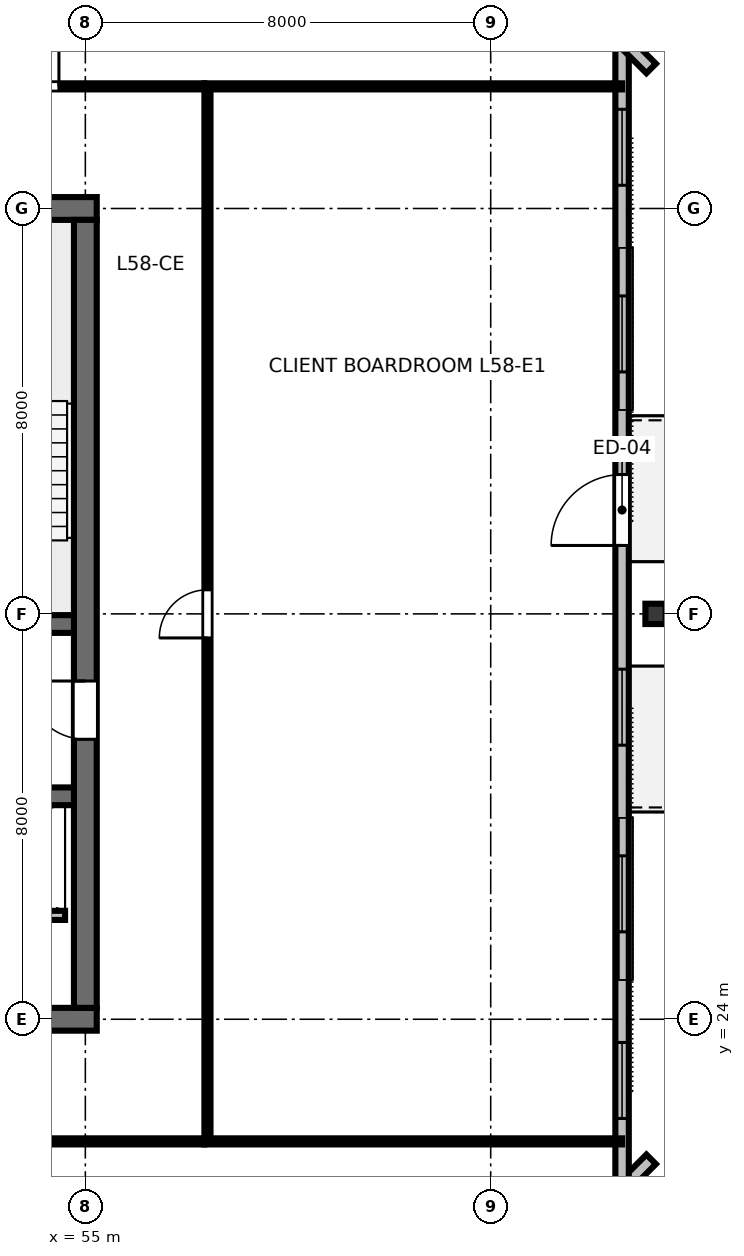
"""IFC4 building model, lengths in metres.
Left out: names, types, materials, properties, quantities, classifications, styles, units other than length and angle.
Written with IfcOpenShell. Run it as: python <this file> out.ifc"""

import sys

from ifc_helpers import new_model, si_unit, direction, frame, frame_2d, origin, origin_2d, place, context, subcontext, project, spatial, rectangle, i_section, extrude, element, fill, save


model = new_model("IFC4")
c1 = context("Model", 3, precision=1e-05, world=origin(), true_north=direction((0.0, 1.0)))
c2 = subcontext(c1, "Body", "Model", "MODEL_VIEW")
j1 = project(units=[si_unit("LENGTHUNIT", "METRE"), si_unit("PLANEANGLEUNIT", "RADIAN")], contexts=[c1])
p1 = place(None, origin())
s1 = spatial("IfcSite", under=j1, at=p1, CompositionType="ELEMENT")
p2 = place(p1, origin())
s2 = spatial("IfcBuilding", under=s1, at=p2, CompositionType="ELEMENT")
p3 = place(p2, frame((0.0, 0.0, 220.2)))
s3 = spatial("IfcBuildingStorey", under=s2, at=p3, CompositionType="ELEMENT", Elevation=220.2)
p4 = place(p3, frame((36.775, 24.0, 0.0), z_axis=(0.0, 0.0, 1.0), x_axis=(1.0, 0.0, 0.0)))
e1 = element("IfcWall", 1, at=p4, inside=s3, PredefinedType="SHEAR", context=c2, shape_type="SweptSolid", body=[
    extrude(rectangle(XDim=18.45, YDim=0.45, at=frame_2d((9.225, 0.0))), origin(), (0.0, 0.0, 1.0), 3.36),
])
p5 = place(p4, frame((13.425, 0.0, 0.0)))
e2 = element("IfcOpeningElement", 2, at=p5, cuts=e1, PredefinedType="OPENING", context=c2, shape_type="SweptSolid", body=[
    extrude(rectangle(XDim=1.6, YDim=2.15, at=frame_2d((0.8, 1.075))), frame((0.0, 0.235, 0.0), z_axis=(0.0, -1.0, 0.0), x_axis=(1.0, 0.0, 0.0)), (0.0, 0.0, 1.0), 0.47),
])
p6 = place(p3, frame((36.775, 40.0, 0.0), z_axis=(0.0, 0.0, 1.0), x_axis=(1.0, 0.0, 0.0)))
e3 = element("IfcWall", 3, at=p6, inside=s3, PredefinedType="SHEAR", context=c2, shape_type="SweptSolid", body=[
    extrude(rectangle(XDim=18.45, YDim=0.45, at=frame_2d((9.225, 0.0))), origin(), (0.0, 0.0, 1.0), 3.36),
])
p7 = place(p6, frame((10.525, 0.0, 0.0)))
e4 = element("IfcOpeningElement", 4, at=p7, cuts=e3, PredefinedType="OPENING", context=c2, shape_type="SweptSolid", body=[
    extrude(rectangle(XDim=1.0, YDim=2.15, at=frame_2d((0.5, 1.075))), frame((0.0, 0.235, 0.0), z_axis=(0.0, -1.0, 0.0), x_axis=(1.0, 0.0, 0.0)), (0.0, 0.0, 1.0), 0.47),
])
p8 = place(p3, frame((55.0, 24.225, 0.0), z_axis=(0.0, 0.0, 1.0), x_axis=(0.0, 1.0, 0.0)))
e5 = element("IfcWall", 5, at=p8, inside=s3, PredefinedType="SHEAR", context=c2, shape_type="SweptSolid", body=[
    extrude(rectangle(XDim=15.55, YDim=0.45, at=frame_2d((7.775, 0.0))), origin(), (0.0, 0.0, 1.0), 3.36),
])
p9 = place(p8, frame((5.3, 0.0, 0.0)))
e6 = element("IfcOpeningElement", 6, at=p9, cuts=e5, PredefinedType="OPENING", context=c2, shape_type="SweptSolid", body=[
    extrude(rectangle(XDim=1.15, YDim=2.15, at=frame_2d((0.575, 1.075))), frame((0.0, 0.235, 0.0), z_axis=(0.0, -1.0, 0.0), x_axis=(1.0, 0.0, 0.0)), (0.0, 0.0, 1.0), 0.47),
])
p10 = place(p3, frame((37.225, 31.8, 0.0), z_axis=(0.0, 0.0, 1.0), x_axis=(1.0, 0.0, 0.0)))
e7 = element("IfcWall", 7, at=p10, inside=s3, PredefinedType="SHEAR", context=c2, shape_type="SweptSolid", body=[
    extrude(rectangle(XDim=17.55, YDim=0.35, at=frame_2d((8.775, 0.0))), origin(), (0.0, 0.0, 1.0), 3.36),
])
p11 = place(p10, frame((0.825, 0.0, 0.0)))
e8 = element("IfcOpeningElement", 8, at=p11, cuts=e7, PredefinedType="OPENING", context=c2, shape_type="SweptSolid", body=[
    extrude(rectangle(XDim=1.1, YDim=2.15, at=frame_2d((0.55, 1.075))), frame((0.0, 0.185, 0.0), z_axis=(0.0, -1.0, 0.0), x_axis=(1.0, 0.0, 0.0)), (0.0, 0.0, 1.0), 0.37),
])
p12 = place(p10, frame((14.725, 0.0, 0.0)))
e9 = element("IfcOpeningElement", 9, at=p12, cuts=e7, PredefinedType="OPENING", context=c2, shape_type="SweptSolid", body=[
    extrude(rectangle(XDim=1.1, YDim=2.15, at=frame_2d((0.55, 1.075))), frame((0.0, 0.185, 0.0), z_axis=(0.0, -1.0, 0.0), x_axis=(1.0, 0.0, 0.0)), (0.0, 0.0, 1.0), 0.37),
])
p13 = place(p3, frame((37.225, 28.4, 0.0), z_axis=(0.0, 0.0, 1.0), x_axis=(1.0, 0.0, 0.0)))
e10 = element("IfcWall", 10, at=p13, inside=s3, PredefinedType="SHEAR", context=c2, shape_type="SweptSolid", body=[
    extrude(rectangle(XDim=17.55, YDim=0.35, at=frame_2d((8.775, 0.0))), origin(), (0.0, 0.0, 1.0), 3.36),
])
p14 = place(p3, frame((66.253, 32.0, 0.0), z_axis=(0.0, 0.0, 1.0), x_axis=(0.0, 1.0, 0.0)))
e11 = element("IfcColumn", 11, at=p14, inside=s3, PredefinedType="COLUMN", context=c2, shape_type="SweptSolid", body=[
    extrude(i_section(OverallWidth=0.401, OverallDepth=0.399, WebThickness=0.025, FlangeThickness=0.04, FilletRadius=0.025, at=origin_2d()), origin(), (0.0, 0.0, 1.0), 3.373),
])
p15 = place(p3, frame((58.809, 13.879, 0.0), z_axis=(0.0, 0.0, 1.0), x_axis=(0.707106781187, 0.707106781187, 0.0)))
e12 = element("IfcWall", 12, at=p15, inside=s3, PredefinedType="STANDARD", context=c2, shape_type="SweptSolid", body=[
    extrude(rectangle(XDim=10.405, YDim=0.265, at=frame_2d((5.203, 0.0))), origin(), (0.0, 0.0, 1.0), 3.375),
])
p16 = place(p3, frame((65.593, 19.851, 0.0), z_axis=(0.0, 0.0, 1.0), x_axis=(0.0, 1.0, 0.0)))
e13 = element("IfcWall", 13, at=p16, inside=s3, PredefinedType="STANDARD", context=c2, shape_type="SweptSolid", body=[
    extrude(rectangle(XDim=24.298, YDim=0.265, at=frame_2d((12.149, 0.0))), origin(), (0.0, 0.0, 1.0), 3.375),
])
p17 = place(p16, frame((13.499, 0.0, 0.0)))
e14 = element("IfcOpeningElement", 14, at=p17, cuts=e13, PredefinedType="OPENING", context=c2, shape_type="SweptSolid", body=[
    extrude(rectangle(XDim=1.4, YDim=2.15, at=frame_2d((0.7, 1.075))), frame((0.0, 0.142, 0.0), z_axis=(0.0, -1.0, 0.0), x_axis=(1.0, 0.0, 0.0)), (0.0, 0.0, 1.0), 0.285),
])
p18 = place(p16, frame((2.191, 0.0, 0.85)))
e15 = element("IfcOpeningElement", 15, at=p18, cuts=e13, PredefinedType="OPENING", context=c2, shape_type="SweptSolid", body=[
    extrude(rectangle(XDim=1.5, YDim=1.85, at=frame_2d((0.75, 0.925))), frame((0.0, 0.142, 0.0), z_axis=(0.0, -1.0, 0.0), x_axis=(1.0, 0.0, 0.0)), (0.0, 0.0, 1.0), 0.285),
])
p19 = place(p16, frame((5.875, 0.0, 0.85)))
e16 = element("IfcOpeningElement", 16, at=p19, cuts=e13, PredefinedType="OPENING", context=c2, shape_type="SweptSolid", body=[
    extrude(rectangle(XDim=1.5, YDim=1.85, at=frame_2d((0.75, 0.925))), frame((0.0, 0.142, 0.0), z_axis=(0.0, -1.0, 0.0), x_axis=(1.0, 0.0, 0.0)), (0.0, 0.0, 1.0), 0.285),
])
p20 = place(p16, frame((9.558, 0.0, 0.85)))
e17 = element("IfcOpeningElement", 17, at=p20, cuts=e13, PredefinedType="OPENING", context=c2, shape_type="SweptSolid", body=[
    extrude(rectangle(XDim=1.5, YDim=1.85, at=frame_2d((0.75, 0.925))), frame((0.0, 0.142, 0.0), z_axis=(0.0, -1.0, 0.0), x_axis=(1.0, 0.0, 0.0)), (0.0, 0.0, 1.0), 0.285),
])
p21 = place(p16, frame((16.924, 0.0, 0.85)))
e18 = element("IfcOpeningElement", 18, at=p21, cuts=e13, PredefinedType="OPENING", context=c2, shape_type="SweptSolid", body=[
    extrude(rectangle(XDim=1.5, YDim=1.85, at=frame_2d((0.75, 0.925))), frame((0.0, 0.142, 0.0), z_axis=(0.0, -1.0, 0.0), x_axis=(1.0, 0.0, 0.0)), (0.0, 0.0, 1.0), 0.285),
])
p22 = place(p16, frame((20.607, 0.0, 0.85)))
e19 = element("IfcOpeningElement", 19, at=p22, cuts=e13, PredefinedType="OPENING", context=c2, shape_type="SweptSolid", body=[
    extrude(rectangle(XDim=1.5, YDim=1.85, at=frame_2d((0.75, 0.925))), frame((0.0, 0.142, 0.0), z_axis=(0.0, -1.0, 0.0), x_axis=(1.0, 0.0, 0.0)), (0.0, 0.0, 1.0), 0.285),
])
p23 = place(p3, frame((66.167, 42.764, 0.0), z_axis=(0.0, 0.0, 1.0), x_axis=(-0.707106781187, 0.707106781187, 0.0)))
e20 = element("IfcWall", 20, at=p23, inside=s3, PredefinedType="STANDARD", context=c2, shape_type="SweptSolid", body=[
    extrude(rectangle(XDim=10.405, YDim=0.265, at=frame_2d((5.203, 0.0))), origin(), (0.0, 0.0, 1.0), 3.375),
])
p24 = place(p3, frame((47.6, 26.05, 0.0), z_axis=(0.0, 0.0, 1.0), x_axis=(1.0, 0.0, 0.0)))
e21 = element("IfcWall", 21, at=p24, inside=s3, PredefinedType="PARTITIONING", context=c2, shape_type="SweptSolid", body=[
    extrude(rectangle(XDim=7.0, YDim=0.18, at=frame_2d((3.5, 0.0))), origin(), (0.0, 0.0, 1.0), 3.375),
])
p25 = place(p24, frame((1.2, 0.0, 0.0)))
e22 = element("IfcOpeningElement", 22, at=p25, cuts=e21, PredefinedType="OPENING", context=c2, shape_type="SweptSolid", body=[
    extrude(rectangle(XDim=1.05, YDim=2.15, at=frame_2d((0.525, 1.075))), frame((0.0, 0.1, 0.0), z_axis=(0.0, -1.0, 0.0), x_axis=(1.0, 0.0, 0.0)), (0.0, 0.0, 1.0), 0.2),
])
p26 = place(p24, frame((3.4, 0.0, 0.0)))
e23 = element("IfcOpeningElement", 23, at=p26, cuts=e21, PredefinedType="OPENING", context=c2, shape_type="SweptSolid", body=[
    extrude(rectangle(XDim=1.05, YDim=2.15, at=frame_2d((0.525, 1.075))), frame((0.0, 0.1, 0.0), z_axis=(0.0, -1.0, 0.0), x_axis=(1.0, 0.0, 0.0)), (0.0, 0.0, 1.0), 0.2),
])
p27 = place(p3, frame((47.02, 21.59, 0.0), z_axis=(0.0, 0.0, 1.0), x_axis=(1.0, 0.0, 0.0)))
e24 = element("IfcWall", 24, at=p27, inside=s3, PredefinedType="PARTITIONING", context=c2, shape_type="SweptSolid", body=[
    extrude(rectangle(XDim=10.33, YDim=0.12, at=frame_2d((5.165, 0.0))), origin(), (0.0, 0.0, 1.0), 2.655),
])
p28 = place(p27, frame((1.104, 0.0, 0.0)))
e25 = element("IfcOpeningElement", 25, at=p28, cuts=e24, PredefinedType="OPENING", context=c2, shape_type="SweptSolid", body=[
    extrude(rectangle(XDim=0.95, YDim=2.15, at=frame_2d((0.475, 1.075))), frame((0.0, 0.07, 0.0), z_axis=(0.0, -1.0, 0.0), x_axis=(1.0, 0.0, 0.0)), (0.0, 0.0, 1.0), 0.14),
])
p29 = place(p27, frame((6.199, 0.0, 0.0)))
e26 = element("IfcOpeningElement", 26, at=p29, cuts=e24, PredefinedType="OPENING", context=c2, shape_type="SweptSolid", body=[
    extrude(rectangle(XDim=0.95, YDim=2.15, at=frame_2d((0.475, 1.075))), frame((0.0, 0.07, 0.0), z_axis=(0.0, -1.0, 0.0), x_axis=(1.0, 0.0, 0.0)), (0.0, 0.0, 1.0), 0.14),
])
p30 = place(p3, frame((47.02, 42.41, 0.0), z_axis=(0.0, 0.0, 1.0), x_axis=(1.0, 0.0, 0.0)))
e27 = element("IfcWall", 27, at=p30, inside=s3, PredefinedType="PARTITIONING", context=c2, shape_type="SweptSolid", body=[
    extrude(rectangle(XDim=10.33, YDim=0.12, at=frame_2d((5.165, 0.0))), origin(), (0.0, 0.0, 1.0), 2.655),
])
p31 = place(p30, frame((1.846, 0.0, 0.0)))
e28 = element("IfcOpeningElement", 28, at=p31, cuts=e27, PredefinedType="OPENING", context=c2, shape_type="SweptSolid", body=[
    extrude(rectangle(XDim=0.95, YDim=2.15, at=frame_2d((0.475, 1.075))), frame((0.0, 0.07, 0.0), z_axis=(0.0, -1.0, 0.0), x_axis=(1.0, 0.0, 0.0)), (0.0, 0.0, 1.0), 0.14),
])
p32 = place(p30, frame((6.509, 0.0, 0.0)))
e29 = element("IfcOpeningElement", 29, at=p32, cuts=e27, PredefinedType="OPENING", context=c2, shape_type="SweptSolid", body=[
    extrude(rectangle(XDim=0.95, YDim=2.15, at=frame_2d((0.475, 1.075))), frame((0.0, 0.07, 0.0), z_axis=(0.0, -1.0, 0.0), x_axis=(1.0, 0.0, 0.0)), (0.0, 0.0, 1.0), 0.14),
])
p33 = place(p3, frame((57.41, 21.65, 0.0), z_axis=(0.0, 0.0, 1.0), x_axis=(0.0, 1.0, 0.0)))
e30 = element("IfcWall", 30, at=p33, inside=s3, PredefinedType="PARTITIONING", context=c2, shape_type="SweptSolid", body=[
    extrude(rectangle(XDim=20.7, YDim=0.12, at=frame_2d((10.35, 0.0))), origin(), (0.0, 0.0, 1.0), 2.655),
])
p34 = place(p33, frame((9.875, 0.0, 0.0)))
e31 = element("IfcOpeningElement", 31, at=p34, cuts=e30, PredefinedType="OPENING", context=c2, shape_type="SweptSolid", body=[
    extrude(rectangle(XDim=0.95, YDim=2.15, at=frame_2d((0.475, 1.075))), frame((0.0, 0.07, 0.0), z_axis=(0.0, -1.0, 0.0), x_axis=(1.0, 0.0, 0.0)), (0.0, 0.0, 1.0), 0.14),
])
for number, where, z_axis, x_axis in (
    (32, (57.35, 21.59, 0.0), (0.0, 0.0, 1.0), (1.0, 0.0, 0.0)),
    (33, (57.35, 42.41, 0.0), (0.0, 0.0, 1.0), (1.0, 0.0, 0.0)),
):
    element("IfcWall", number, at=place(p3, frame(where, z_axis=z_axis, x_axis=x_axis)), inside=s3, PredefinedType="PARTITIONING", context=c2, shape_type="SweptSolid", body=[
        extrude(rectangle(XDim=8.243, YDim=0.12, at=frame_2d((4.121, 0.0))), origin(), (0.0, 0.0, 1.0), 2.655),
    ])
p35 = place(p17, origin())
e34 = element("IfcDoor", 34, at=p35, inside=s3, OperationType="SINGLE_SWING_LEFT", PredefinedType="DOOR", context=c2, shape_type="SweptSolid", body=[
    extrude(rectangle(XDim=1.4, YDim=2.15, at=frame_2d((0.7, 1.075))), frame((0.0, 0.025, 0.0), z_axis=(0.0, -1.0, 0.0), x_axis=(1.0, 0.0, 0.0)), (0.0, 0.0, 1.0), 0.05),
])
fill(e14, e34)
p36 = place(p18, origin())
e35 = element("IfcWindow", 35, at=p36, inside=s3, PartitioningType="SINGLE_PANEL", PredefinedType="WINDOW", context=c2, shape_type="SweptSolid", body=[
    extrude(rectangle(XDim=1.5, YDim=1.85, at=frame_2d((0.75, 0.925))), frame((0.0, 0.03, 0.0), z_axis=(0.0, -1.0, 0.0), x_axis=(1.0, 0.0, 0.0)), (0.0, 0.0, 1.0), 0.06),
])
fill(e15, e35)
p37 = place(p19, origin())
e36 = element("IfcWindow", 36, at=p37, inside=s3, PartitioningType="SINGLE_PANEL", PredefinedType="WINDOW", context=c2, shape_type="SweptSolid", body=[
    extrude(rectangle(XDim=1.5, YDim=1.85, at=frame_2d((0.75, 0.925))), frame((0.0, 0.03, 0.0), z_axis=(0.0, -1.0, 0.0), x_axis=(1.0, 0.0, 0.0)), (0.0, 0.0, 1.0), 0.06),
])
fill(e16, e36)
p38 = place(p20, origin())
e37 = element("IfcWindow", 37, at=p38, inside=s3, PartitioningType="SINGLE_PANEL", PredefinedType="WINDOW", context=c2, shape_type="SweptSolid", body=[
    extrude(rectangle(XDim=1.5, YDim=1.85, at=frame_2d((0.75, 0.925))), frame((0.0, 0.03, 0.0), z_axis=(0.0, -1.0, 0.0), x_axis=(1.0, 0.0, 0.0)), (0.0, 0.0, 1.0), 0.06),
])
fill(e17, e37)
p39 = place(p21, origin())
e38 = element("IfcWindow", 38, at=p39, inside=s3, PartitioningType="SINGLE_PANEL", PredefinedType="WINDOW", context=c2, shape_type="SweptSolid", body=[
    extrude(rectangle(XDim=1.5, YDim=1.85, at=frame_2d((0.75, 0.925))), frame((0.0, 0.03, 0.0), z_axis=(0.0, -1.0, 0.0), x_axis=(1.0, 0.0, 0.0)), (0.0, 0.0, 1.0), 0.06),
])
fill(e18, e38)
p40 = place(p22, origin())
e39 = element("IfcWindow", 39, at=p40, inside=s3, PartitioningType="SINGLE_PANEL", PredefinedType="WINDOW", context=c2, shape_type="SweptSolid", body=[
    extrude(rectangle(XDim=1.5, YDim=1.85, at=frame_2d((0.75, 0.925))), frame((0.0, 0.03, 0.0), z_axis=(0.0, -1.0, 0.0), x_axis=(1.0, 0.0, 0.0)), (0.0, 0.0, 1.0), 0.06),
])
fill(e19, e39)
p41 = place(p9, origin())
e40 = element("IfcDoor", 40, at=p41, inside=s3, OperationType="SINGLE_SWING_RIGHT", PredefinedType="DOOR", context=c2, shape_type="SweptSolid", body=[
    extrude(rectangle(XDim=1.15, YDim=2.15, at=frame_2d((0.575, 1.075))), frame((0.0, 0.025, 0.0), z_axis=(0.0, -1.0, 0.0), x_axis=(1.0, 0.0, 0.0)), (0.0, 0.0, 1.0), 0.05),
])
fill(e6, e40)
p42 = place(p32, origin())
e41 = element("IfcDoor", 41, at=p42, inside=s3, OperationType="SINGLE_SWING_RIGHT", PredefinedType="DOOR", context=c2, shape_type="SweptSolid", body=[
    extrude(rectangle(XDim=0.95, YDim=2.15, at=frame_2d((0.475, 1.075))), frame((0.0, 0.025, 0.0), z_axis=(0.0, -1.0, 0.0), x_axis=(1.0, 0.0, 0.0)), (0.0, 0.0, 1.0), 0.05),
])
fill(e29, e41)
p43 = place(p34, origin())
e42 = element("IfcDoor", 42, at=p43, inside=s3, OperationType="SINGLE_SWING_LEFT", PredefinedType="DOOR", context=c2, shape_type="SweptSolid", body=[
    extrude(rectangle(XDim=0.95, YDim=2.15, at=frame_2d((0.475, 1.075))), frame((0.0, 0.025, 0.0), z_axis=(0.0, -1.0, 0.0), x_axis=(1.0, 0.0, 0.0)), (0.0, 0.0, 1.0), 0.05),
])
fill(e31, e42)
save(model, sys.argv[1])
